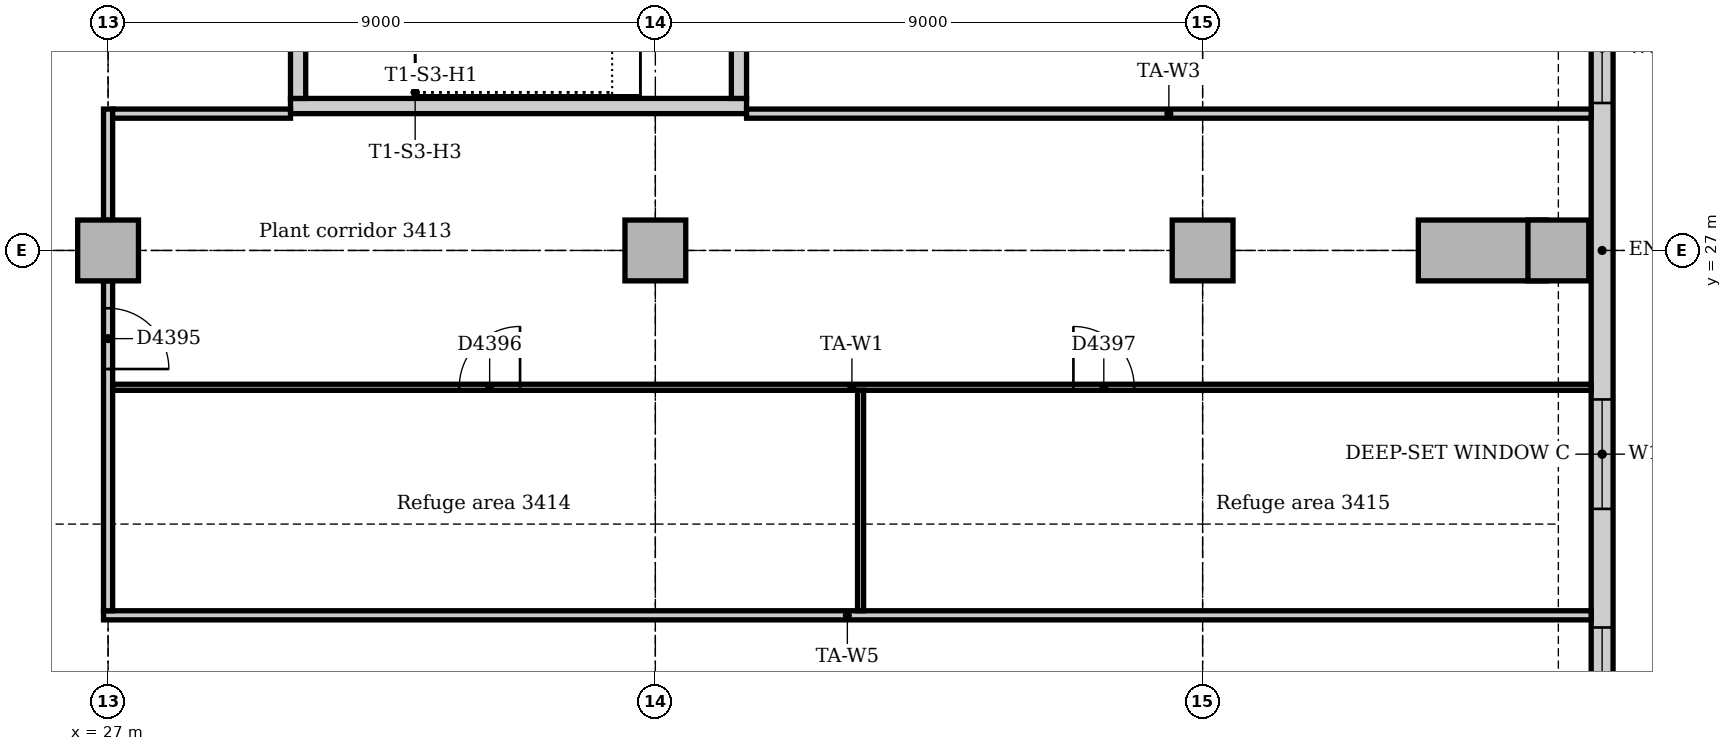
"""IFC4 building model, lengths in metres.
Left out: names, types, materials, properties, quantities, classifications, styles, units other than length and angle.
Written with IfcOpenShell. Run it as: python <this file> out.ifc"""

import sys

from ifc_helpers import new_model, si_unit, direction, frame, frame_2d, origin, origin_2d, place, context, subcontext, project, spatial, rectangle, extrude, element, fill, save


model = new_model("IFC4")
c1 = context("Model", 3, precision=1e-05, world=origin(), true_north=direction((0.0, 1.0)))
c2 = subcontext(c1, "Body", "Model", "MODEL_VIEW")
j1 = project(units=[si_unit("LENGTHUNIT", "METRE"), si_unit("PLANEANGLEUNIT", "RADIAN")], contexts=[c1])
p1 = place(None, origin())
s1 = spatial("IfcSite", under=j1, at=p1, CompositionType="ELEMENT")
p2 = place(p1, origin())
s2 = spatial("IfcBuilding", under=s1, at=p2, CompositionType="ELEMENT")
p3 = place(p2, frame((0.0, 0.0, 144.0)))
s3 = spatial("IfcBuildingStorey", under=s2, at=p3, CompositionType="ELEMENT", Elevation=144.0)
p4 = place(p3, frame((30.0, 29.375, 0.0), z_axis=(0.0, 0.0, 1.0), x_axis=(1.0, 0.0, 0.0)))
e1 = element("IfcWall", 1, at=p4, inside=s3, PredefinedType="SOLIDWALL", context=c2, shape_type="SweptSolid", body=[
    extrude(rectangle(XDim=7.5, YDim=0.25, at=frame_2d((3.75, 0.0))), origin(), (0.0, 0.0, 1.0), 5.0),
])
p5 = place(p3, frame((37.375, 29.5, 0.0), z_axis=(0.0, 0.0, 1.0), x_axis=(0.0, 1.0, 0.0)))
e2 = element("IfcWall", 2, at=p5, inside=s3, PredefinedType="SOLIDWALL", context=c2, shape_type="SweptSolid", body=[
    extrude(rectangle(XDim=4.0, YDim=0.25, at=frame_2d((2.0, 0.0))), origin(), (0.0, 0.0, 1.0), 5.0),
])
p6 = place(p3, frame((30.125, 33.5, 0.0), z_axis=(0.0, 0.0, 1.0), x_axis=(0.0, -1.0, 0.0)))
e3 = element("IfcWall", 3, at=p6, inside=s3, PredefinedType="SOLIDWALL", context=c2, shape_type="SweptSolid", body=[
    extrude(rectangle(XDim=4.0, YDim=0.25, at=frame_2d((2.0, 0.0))), origin(), (0.0, 0.0, 1.0), 5.0),
])
p7 = place(p6, frame((1.5, 0.0, 0.0)))
e4 = element("IfcOpeningElement", 4, at=p7, cuts=e3, PredefinedType="OPENING", context=c2, shape_type="SweptSolid", body=[
    extrude(rectangle(XDim=1.0, YDim=2.1, at=frame_2d((0.5, 1.05))), frame((0.0, 0.135, 0.0), z_axis=(0.0, -1.0, 0.0), x_axis=(1.0, 0.0, 0.0)), (0.0, 0.0, 1.0), 0.27),
])
for number, where, z_axis, x_axis in (
    (5, (50.85, 27.0, 0.0), (0.0, 0.0, 1.0), (1.0, 0.0, 0.0)),
    (6, (27.0, 27.0, 0.0), (0.0, 0.0, 1.0), (1.0, 0.0, 0.0)),
    (7, (36.0, 27.0, 0.0), (0.0, 0.0, 1.0), (1.0, 0.0, 0.0)),
    (8, (45.0, 27.0, 0.0), (0.0, 0.0, 1.0), (1.0, 0.0, 0.0)),
):
    element("IfcColumn", number, at=place(p3, frame(where, z_axis=z_axis, x_axis=x_axis)), inside=s3, PredefinedType="COLUMN", context=c2, shape_type="SweptSolid", body=[
        extrude(rectangle(XDim=1.0, YDim=1.0, at=origin_2d()), origin(), (0.0, 0.0, 1.0), 4.85),
    ])
p8 = place(p3, frame((51.57, 14.743, 0.0), z_axis=(0.0, 0.0, 1.0), x_axis=(0.0, 1.0, 0.0)))
e9 = element("IfcWall", 9, at=p8, inside=s3, PredefinedType="STANDARD", context=c2, shape_type="SweptSolid", body=[
    extrude(rectangle(XDim=24.515, YDim=0.36, at=frame_2d((12.257, 0.0))), origin(), (0.0, 0.0, 1.0), 4.85),
])
p9 = place(p8, frame((4.257, 0.0, 0.9)))
e10 = element("IfcOpeningElement", 10, at=p9, cuts=e9, PredefinedType="OPENING", context=c2, shape_type="SweptSolid", body=[
    extrude(rectangle(XDim=1.8, YDim=2.2, at=frame_2d((0.9, 1.1))), frame((0.0, 0.19, 0.0), z_axis=(0.0, -1.0, 0.0), x_axis=(1.0, 0.0, 0.0)), (0.0, 0.0, 1.0), 0.38),
])
p10 = place(p8, frame((8.007, 0.0, 1.2)))
e11 = element("IfcOpeningElement", 11, at=p10, cuts=e9, PredefinedType="OPENING", context=c2, shape_type="SweptSolid", body=[
    extrude(rectangle(XDim=1.8, YDim=1.2, at=frame_2d((0.9, 0.6))), frame((0.0, 0.19, 0.0), z_axis=(0.0, -1.0, 0.0), x_axis=(1.0, 0.0, 0.0)), (0.0, 0.0, 1.0), 0.38),
])
p11 = place(p8, frame((14.682, 0.0, 0.9)))
e12 = element("IfcOpeningElement", 12, at=p11, cuts=e9, PredefinedType="OPENING", context=c2, shape_type="SweptSolid", body=[
    extrude(rectangle(XDim=1.8, YDim=2.2, at=frame_2d((0.9, 1.1))), frame((0.0, 0.19, 0.0), z_axis=(0.0, -1.0, 0.0), x_axis=(1.0, 0.0, 0.0)), (0.0, 0.0, 1.0), 0.38),
])
p12 = place(p8, frame((17.732, 0.0, 0.9)))
e13 = element("IfcOpeningElement", 13, at=p12, cuts=e9, PredefinedType="OPENING", context=c2, shape_type="SweptSolid", body=[
    extrude(rectangle(XDim=1.8, YDim=2.2, at=frame_2d((0.9, 1.1))), frame((0.0, 0.19, 0.0), z_axis=(0.0, -1.0, 0.0), x_axis=(1.0, 0.0, 0.0)), (0.0, 0.0, 1.0), 0.38),
])
p13 = place(p3, frame((26.925, 21.0, 0.0), z_axis=(0.0, 0.0, 1.0), x_axis=(1.0, 0.0, 0.0)))
e14 = element("IfcWall", 14, at=p13, inside=s3, PredefinedType="PARTITIONING", context=c2, shape_type="SweptSolid", body=[
    extrude(rectangle(XDim=24.465, YDim=0.15, at=frame_2d((12.232, 0.0))), origin(), (0.0, 0.0, 1.0), 4.85),
])
p14 = place(p3, frame((27.0, 21.075, 0.0), z_axis=(0.0, 0.0, 1.0), x_axis=(0.0, 1.0, 0.0)))
e15 = element("IfcWall", 15, at=p14, inside=s3, PredefinedType="PARTITIONING", context=c2, shape_type="SweptSolid", body=[
    extrude(rectangle(XDim=5.425, YDim=0.15, at=frame_2d((2.712, 0.0))), origin(), (0.0, 0.0, 1.0), 4.362),
])
p15 = place(p14, frame((3.975, 0.0, 0.0)))
e16 = element("IfcOpeningElement", 16, at=p15, cuts=e15, PredefinedType="OPENING", context=c2, shape_type="SweptSolid", body=[
    extrude(rectangle(XDim=1.0, YDim=2.1, at=frame_2d((0.5, 1.05))), frame((0.0, 0.085, 0.0), z_axis=(0.0, -1.0, 0.0), x_axis=(1.0, 0.0, 0.0)), (0.0, 0.0, 1.0), 0.17),
])
p16 = place(p3, frame((27.0, 27.5, 0.0), z_axis=(0.0, 0.0, 1.0), x_axis=(0.0, 1.0, 0.0)))
e17 = element("IfcWall", 17, at=p16, inside=s3, PredefinedType="PARTITIONING", context=c2, shape_type="SweptSolid", body=[
    extrude(rectangle(XDim=1.825, YDim=0.15, at=frame_2d((0.912, 0.0))), origin(), (0.0, 0.0, 1.0), 4.362),
])
p17 = place(p3, frame((27.075, 29.25, 0.0), z_axis=(0.0, 0.0, 1.0), x_axis=(1.0, 0.0, 0.0)))
e18 = element("IfcWall", 18, at=p17, inside=s3, PredefinedType="PARTITIONING", context=c2, shape_type="SweptSolid", body=[
    extrude(rectangle(XDim=2.925, YDim=0.15, at=frame_2d((1.462, 0.0))), origin(), (0.0, 0.0, 1.0), 4.85),
])
p18 = place(p3, frame((37.5, 29.25, 0.0), z_axis=(0.0, 0.0, 1.0), x_axis=(1.0, 0.0, 0.0)))
e19 = element("IfcWall", 19, at=p18, inside=s3, PredefinedType="PARTITIONING", context=c2, shape_type="SweptSolid", body=[
    extrude(rectangle(XDim=13.89, YDim=0.15, at=frame_2d((6.945, 0.0))), origin(), (0.0, 0.0, 1.0), 4.85),
])
p19 = place(p3, frame((27.075, 24.75, 0.0), z_axis=(0.0, 0.0, 1.0), x_axis=(1.0, 0.0, 0.0)))
e20 = element("IfcWall", 20, at=p19, inside=s3, PredefinedType="PARTITIONING", context=c2, shape_type="SweptSolid", body=[
    extrude(rectangle(XDim=24.315, YDim=0.1, at=frame_2d((12.158, 0.0))), origin(), (0.0, 0.0, 1.0), 4.85),
])
p20 = place(p19, frame((5.7, 0.0, 0.0)))
e21 = element("IfcOpeningElement", 21, at=p20, cuts=e20, PredefinedType="OPENING", context=c2, shape_type="SweptSolid", body=[
    extrude(rectangle(XDim=1.0, YDim=2.1, at=frame_2d((0.5, 1.05))), frame((0.0, 0.06, 0.0), z_axis=(0.0, -1.0, 0.0), x_axis=(1.0, 0.0, 0.0)), (0.0, 0.0, 1.0), 0.12),
])
p21 = place(p19, frame((15.8, 0.0, 0.0)))
e22 = element("IfcOpeningElement", 22, at=p21, cuts=e20, PredefinedType="OPENING", context=c2, shape_type="SweptSolid", body=[
    extrude(rectangle(XDim=1.0, YDim=2.1, at=frame_2d((0.5, 1.05))), frame((0.0, 0.06, 0.0), z_axis=(0.0, -1.0, 0.0), x_axis=(1.0, 0.0, 0.0)), (0.0, 0.0, 1.0), 0.12),
])
p22 = place(p3, frame((39.375, 21.075, 0.0), z_axis=(0.0, 0.0, 1.0), x_axis=(0.0, 1.0, 0.0)))
e23 = element("IfcWall", 23, at=p22, inside=s3, PredefinedType="PARTITIONING", context=c2, shape_type="SweptSolid", body=[
    extrude(rectangle(XDim=3.625, YDim=0.1, at=frame_2d((1.812, 0.0))), origin(), (0.0, 0.0, 1.0), 4.85),
])
p23 = place(p9, origin())
e24 = element("IfcWindow", 24, at=p23, inside=s3, PartitioningType="SINGLE_PANEL", PredefinedType="WINDOW", context=c2, shape_type="SweptSolid", body=[
    extrude(rectangle(XDim=1.8, YDim=2.2, at=frame_2d((0.9, 1.1))), frame((0.0, 0.13, 0.0), z_axis=(0.0, -1.0, 0.0), x_axis=(1.0, 0.0, 0.0)), (0.0, 0.0, 1.0), 0.06),
])
fill(e10, e24)
p24 = place(p10, origin())
e25 = element("IfcWindow", 25, at=p24, inside=s3, PartitioningType="SINGLE_PANEL", PredefinedType="WINDOW", context=c2, shape_type="SweptSolid", body=[
    extrude(rectangle(XDim=1.8, YDim=1.2, at=frame_2d((0.9, 0.6))), frame((0.0, 0.13, 0.0), z_axis=(0.0, -1.0, 0.0), x_axis=(1.0, 0.0, 0.0)), (0.0, 0.0, 1.0), 0.06),
])
fill(e11, e25)
p25 = place(p11, origin())
e26 = element("IfcWindow", 26, at=p25, inside=s3, PartitioningType="SINGLE_PANEL", PredefinedType="WINDOW", context=c2, shape_type="SweptSolid", body=[
    extrude(rectangle(XDim=1.8, YDim=2.2, at=frame_2d((0.9, 1.1))), frame((0.0, 0.13, 0.0), z_axis=(0.0, -1.0, 0.0), x_axis=(1.0, 0.0, 0.0)), (0.0, 0.0, 1.0), 0.06),
])
fill(e12, e26)
p26 = place(p15, frame((1.0, 0.0, 0.0), z_axis=(0.0, 0.0, 1.0), x_axis=(-1.0, 0.0, 0.0)))
e27 = element("IfcDoor", 27, at=p26, inside=s3, OperationType="SINGLE_SWING_RIGHT", PredefinedType="DOOR", context=c2, shape_type="SweptSolid", body=[
    extrude(rectangle(XDim=1.0, YDim=2.1, at=frame_2d((0.5, 1.05))), frame((0.0, 0.025, 0.0), z_axis=(0.0, -1.0, 0.0), x_axis=(1.0, 0.0, 0.0)), (0.0, 0.0, 1.0), 0.05),
])
fill(e16, e27)
p27 = place(p20, origin())
e28 = element("IfcDoor", 28, at=p27, inside=s3, OperationType="SINGLE_SWING_RIGHT", PredefinedType="DOOR", context=c2, shape_type="SweptSolid", body=[
    extrude(rectangle(XDim=1.0, YDim=2.1, at=frame_2d((0.5, 1.05))), frame((0.0, 0.025, 0.0), z_axis=(0.0, -1.0, 0.0), x_axis=(1.0, 0.0, 0.0)), (0.0, 0.0, 1.0), 0.05),
])
fill(e21, e28)
p28 = place(p21, origin())
e29 = element("IfcDoor", 29, at=p28, inside=s3, OperationType="SINGLE_SWING_LEFT", PredefinedType="DOOR", context=c2, shape_type="SweptSolid", body=[
    extrude(rectangle(XDim=1.0, YDim=2.1, at=frame_2d((0.5, 1.05))), frame((0.0, 0.025, 0.0), z_axis=(0.0, -1.0, 0.0), x_axis=(1.0, 0.0, 0.0)), (0.0, 0.0, 1.0), 0.05),
])
fill(e22, e29)
save(model, sys.argv[1])
